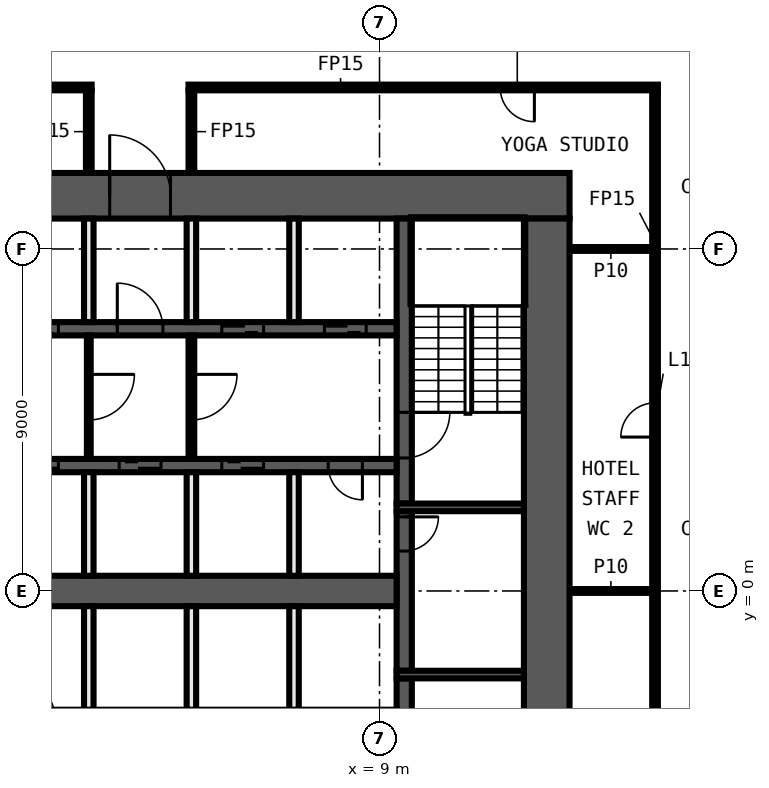
"""IFC4 building model, lengths in metres.
Left out: names, types, materials, properties, quantities, classifications, styles, units other than length and angle.
Written with IfcOpenShell. Run it as: python <this file> out.ifc"""

import sys

from ifc_helpers import new_model, si_unit, direction, frame, frame_2d, origin, place, context, subcontext, project, spatial, rectangle, extrude, element, fill, save


model = new_model("IFC4")
c1 = context("Model", 3, precision=1e-05, world=origin(), true_north=direction((0.0, 1.0)))
c2 = subcontext(c1, "Body", "Model", "MODEL_VIEW")
j1 = project(units=[si_unit("LENGTHUNIT", "METRE"), si_unit("PLANEANGLEUNIT", "RADIAN")], contexts=[c1])
p1 = place(None, origin())
s1 = spatial("IfcSite", under=j1, at=p1, CompositionType="ELEMENT")
p2 = place(p1, origin())
s2 = spatial("IfcBuilding", under=s1, at=p2, CompositionType="ELEMENT")
p3 = place(p2, frame((0.0, 0.0, 69.9)))
s3 = spatial("IfcBuildingStorey", under=s2, at=p3, CompositionType="ELEMENT", Elevation=69.9)
for number, where, z_axis, x_axis in (
    (1, (14.0, 0.0, 0.0), (0.0, 0.0, 1.0), (1.0, 0.0, 0.0)),
    (2, (14.0, 9.0, 0.0), (0.0, 0.0, 1.0), (1.0, 0.0, 0.0)),
):
    element("IfcWall", number, at=place(p3, frame(where, z_axis=z_axis, x_axis=x_axis)), inside=s3, PredefinedType="PARTITIONING", context=c2, shape_type="SweptSolid", body=[
        extrude(rectangle(XDim=2.175, YDim=0.1, at=frame_2d((1.087, 0.0))), origin(), (0.0, 0.0, 1.0), 3.3),
    ])
p4 = place(p3, frame((1.425, 13.25, 0.0), z_axis=(0.0, 0.0, 1.0), x_axis=(-1.0, 0.0, 0.0)))
e3 = element("IfcWall", 3, at=p4, inside=s3, PredefinedType="PARTITIONING", context=c2, shape_type="SweptSolid", body=[
    extrude(rectangle(XDim=17.75, YDim=0.15, at=frame_2d((8.875, 0.0))), origin(), (0.0, 0.0, 1.0), 3.3),
])
p5 = place(p4, frame((5.475, 0.0, 0.0)))
e4 = element("IfcOpeningElement", 4, at=p5, cuts=e3, PredefinedType="OPENING", context=c2, shape_type="SweptSolid", body=[
    extrude(rectangle(XDim=0.9, YDim=2.1, at=frame_2d((0.45, 1.05))), frame((0.0, 0.085, 0.0), z_axis=(0.0, -1.0, 0.0), x_axis=(1.0, 0.0, 0.0)), (0.0, 0.0, 1.0), 0.17),
])
p6 = place(p4, frame((13.6, 0.0, 0.0)))
e5 = element("IfcOpeningElement", 5, at=p6, cuts=e3, PredefinedType="OPENING", context=c2, shape_type="SweptSolid", body=[
    extrude(rectangle(XDim=0.9, YDim=2.1, at=frame_2d((0.45, 1.05))), frame((0.0, 0.085, 0.0), z_axis=(0.0, -1.0, 0.0), x_axis=(1.0, 0.0, 0.0)), (0.0, 0.0, 1.0), 0.17),
])
p7 = place(p3, frame((16.325, 13.25, 0.0), z_axis=(0.0, 0.0, 1.0), x_axis=(-1.0, 0.0, 0.0)))
e6 = element("IfcWall", 6, at=p7, inside=s3, PredefinedType="PARTITIONING", context=c2, shape_type="SweptSolid", body=[
    extrude(rectangle(XDim=12.35, YDim=0.15, at=frame_2d((6.175, 0.0))), origin(), (0.0, 0.0, 1.0), 3.3),
])
p8 = place(p7, frame((3.25, 0.0, 0.0)))
e7 = element("IfcOpeningElement", 7, at=p8, cuts=e6, PredefinedType="OPENING", context=c2, shape_type="SweptSolid", body=[
    extrude(rectangle(XDim=0.9, YDim=2.1, at=frame_2d((0.45, 1.05))), frame((0.0, 0.085, 0.0), z_axis=(0.0, -1.0, 0.0), x_axis=(1.0, 0.0, 0.0)), (0.0, 0.0, 1.0), 0.17),
])
p9 = place(p3, frame((16.25, -13.175, 0.0), z_axis=(0.0, 0.0, 1.0), x_axis=(0.0, 1.0, 0.0)))
e8 = element("IfcWall", 8, at=p9, inside=s3, PredefinedType="PARTITIONING", context=c2, shape_type="SweptSolid", body=[
    extrude(rectangle(XDim=26.35, YDim=0.15, at=frame_2d((13.175, 0.0))), origin(), (0.0, 0.0, 1.0), 3.3),
])
p10 = place(p9, frame((8.225, 0.0, 0.0)))
e9 = element("IfcOpeningElement", 9, at=p10, cuts=e8, PredefinedType="OPENING", context=c2, shape_type="SweptSolid", body=[
    extrude(rectangle(XDim=0.9, YDim=2.1, at=frame_2d((0.45, 1.05))), frame((0.0, 0.085, 0.0), z_axis=(0.0, -1.0, 0.0), x_axis=(1.0, 0.0, 0.0)), (0.0, 0.0, 1.0), 0.17),
])
p11 = place(p9, frame((17.225, 0.0, 0.0)))
e10 = element("IfcOpeningElement", 10, at=p11, cuts=e8, PredefinedType="OPENING", context=c2, shape_type="SweptSolid", body=[
    extrude(rectangle(XDim=0.9, YDim=2.1, at=frame_2d((0.45, 1.05))), frame((0.0, 0.085, 0.0), z_axis=(0.0, -1.0, 0.0), x_axis=(1.0, 0.0, 0.0)), (0.0, 0.0, 1.0), 0.17),
])
for number, where, z_axis, x_axis in (
    (11, (4.05, 11.0, 0.0), (0.0, 0.0, 1.0), (0.0, 1.0, 0.0)),
    (12, (1.35, 11.0, 0.0), (0.0, 0.0, 1.0), (0.0, 1.0, 0.0)),
):
    element("IfcWall", number, at=place(p3, frame(where, z_axis=z_axis, x_axis=x_axis)), inside=s3, PredefinedType="PARTITIONING", context=c2, shape_type="SweptSolid", body=[
        extrude(rectangle(XDim=2.175, YDim=0.15, at=frame_2d((1.087, 0.0))), origin(), (0.0, 0.0, 1.0), 3.3),
    ])
p12 = place(p3, frame((-14.0, 10.4, 0.0), z_axis=(0.0, 0.0, 1.0), x_axis=(1.0, 0.0, 0.0)))
e13 = element("IfcWall", 13, at=p12, inside=s3, PredefinedType="SHEAR", context=c2, shape_type="SweptSolid", body=[
    extrude(rectangle(XDim=28.0, YDim=1.2, at=frame_2d((14.0, 0.0))), origin(), (0.0, 0.0, 1.0), 3.3),
])
p13 = place(p12, frame((15.9, 0.0, 0.0)))
e14 = element("IfcOpeningElement", 14, at=p13, cuts=e13, PredefinedType="OPENING", context=c2, shape_type="SweptSolid", body=[
    extrude(rectangle(XDim=1.6, YDim=2.1, at=frame_2d((0.8, 1.05))), frame((0.0, 0.61, 0.0), z_axis=(0.0, -1.0, 0.0), x_axis=(1.0, 0.0, 0.0)), (0.0, 0.0, 1.0), 1.22),
])
p14 = place(p3, frame((13.4, 9.8, 0.0), z_axis=(0.0, 0.0, 1.0), x_axis=(0.0, -1.0, 0.0)))
e15 = element("IfcWall", 15, at=p14, inside=s3, PredefinedType="SHEAR", context=c2, shape_type="SweptSolid", body=[
    extrude(rectangle(XDim=19.6, YDim=1.2, at=frame_2d((9.8, 0.0))), origin(), (0.0, 0.0, 1.0), 3.3),
])
p15 = place(p3, frame((9.65, -2.3, 0.0), z_axis=(0.0, 0.0, 1.0), x_axis=(0.0, -1.0, 0.0)))
e16 = element("IfcWall", 16, at=p15, inside=s3, PredefinedType="SHEAR", context=c2, shape_type="SweptSolid", body=[
    extrude(rectangle(XDim=7.5, YDim=0.4, at=frame_2d((3.75, 0.0))), origin(), (0.0, 0.0, 1.0), 3.3),
])
p16 = place(p15, frame((1.2, 0.0, 0.0)))
e17 = element("IfcOpeningElement", 17, at=p16, cuts=e16, PredefinedType="OPENING", context=c2, shape_type="SweptSolid", body=[
    extrude(rectangle(XDim=1.2, YDim=2.1, at=frame_2d((0.6, 1.05))), frame((0.0, 0.21, 0.0), z_axis=(0.0, -1.0, 0.0), x_axis=(1.0, 0.0, 0.0)), (0.0, 0.0, 1.0), 0.42),
])
p17 = place(p3, frame((9.65, 2.1, 0.0), z_axis=(0.0, 0.0, 1.0), x_axis=(0.0, -1.0, 0.0)))
e18 = element("IfcWall", 18, at=p17, inside=s3, PredefinedType="SHEAR", context=c2, shape_type="SweptSolid", body=[
    extrude(rectangle(XDim=4.2, YDim=0.4, at=frame_2d((2.1, 0.0))), origin(), (0.0, 0.0, 1.0), 3.3),
])
p18 = place(p17, frame((0.15, 0.0, 0.0)))
e19 = element("IfcOpeningElement", 19, at=p18, cuts=e18, PredefinedType="OPENING", context=c2, shape_type="SweptSolid", body=[
    extrude(rectangle(XDim=0.9, YDim=2.1, at=frame_2d((0.45, 1.05))), frame((0.0, 0.21, 0.0), z_axis=(0.0, -1.0, 0.0), x_axis=(1.0, 0.0, 0.0)), (0.0, 0.0, 1.0), 0.42),
])
p19 = place(p3, frame((9.65, 9.8, 0.0), z_axis=(0.0, 0.0, 1.0), x_axis=(0.0, -1.0, 0.0)))
e20 = element("IfcWall", 20, at=p19, inside=s3, PredefinedType="SHEAR", context=c2, shape_type="SweptSolid", body=[
    extrude(rectangle(XDim=7.5, YDim=0.4, at=frame_2d((3.75, 0.0))), origin(), (0.0, 0.0, 1.0), 3.3),
])
p20 = place(p19, frame((5.1, 0.0, 0.0)))
e21 = element("IfcOpeningElement", 21, at=p20, cuts=e20, PredefinedType="OPENING", context=c2, shape_type="SweptSolid", body=[
    extrude(rectangle(XDim=1.2, YDim=2.1, at=frame_2d((0.6, 1.05))), frame((0.0, 0.21, 0.0), z_axis=(0.0, -1.0, 0.0), x_axis=(1.0, 0.0, 0.0)), (0.0, 0.0, 1.0), 0.42),
])
for number, where, z_axis, x_axis in (
    (22, (9.45, 2.2, 0.0), (0.0, 0.0, 1.0), (1.0, 0.0, 0.0)),
    (23, (9.45, -2.2, 0.0), (0.0, 0.0, 1.0), (1.0, 0.0, 0.0)),
):
    element("IfcWall", number, at=place(p3, frame(where, z_axis=z_axis, x_axis=x_axis)), inside=s3, PredefinedType="SHEAR", context=c2, shape_type="SweptSolid", body=[
        extrude(rectangle(XDim=3.35, YDim=0.2, at=frame_2d((1.675, 0.0))), origin(), (0.0, 0.0, 1.0), 3.3),
    ])
p21 = place(p3, frame((-9.45, 6.9, 0.0), z_axis=(0.0, 0.0, 1.0), x_axis=(1.0, 0.0, 0.0)))
e24 = element("IfcWall", 24, at=p21, inside=s3, PredefinedType="SHEAR", context=c2, shape_type="SweptSolid", body=[
    extrude(rectangle(XDim=18.9, YDim=0.35, at=frame_2d((9.45, 0.0))), origin(), (0.0, 0.0, 1.0), 3.3),
])
p22 = place(p21, frame((0.8, 0.0, 0.0)))
e25 = element("IfcOpeningElement", 25, at=p22, cuts=e24, PredefinedType="OPENING", context=c2, shape_type="SweptSolid", body=[
    extrude(rectangle(XDim=1.1, YDim=2.1, at=frame_2d((0.55, 1.05))), frame((0.0, 0.185, 0.0), z_axis=(0.0, -1.0, 0.0), x_axis=(1.0, 0.0, 0.0)), (0.0, 0.0, 1.0), 0.37),
])
p23 = place(p21, frame((3.5, 0.0, 0.0)))
e26 = element("IfcOpeningElement", 26, at=p23, cuts=e24, PredefinedType="OPENING", context=c2, shape_type="SweptSolid", body=[
    extrude(rectangle(XDim=1.1, YDim=2.1, at=frame_2d((0.55, 1.05))), frame((0.0, 0.185, 0.0), z_axis=(0.0, -1.0, 0.0), x_axis=(1.0, 0.0, 0.0)), (0.0, 0.0, 1.0), 0.37),
])
p24 = place(p21, frame((6.2, 0.0, 0.0)))
e27 = element("IfcOpeningElement", 27, at=p24, cuts=e24, PredefinedType="OPENING", context=c2, shape_type="SweptSolid", body=[
    extrude(rectangle(XDim=1.1, YDim=2.1, at=frame_2d((0.55, 1.05))), frame((0.0, 0.185, 0.0), z_axis=(0.0, -1.0, 0.0), x_axis=(1.0, 0.0, 0.0)), (0.0, 0.0, 1.0), 0.37),
])
p25 = place(p21, frame((8.9, 0.0, 0.0)))
e28 = element("IfcOpeningElement", 28, at=p25, cuts=e24, PredefinedType="OPENING", context=c2, shape_type="SweptSolid", body=[
    extrude(rectangle(XDim=1.1, YDim=2.1, at=frame_2d((0.55, 1.05))), frame((0.0, 0.185, 0.0), z_axis=(0.0, -1.0, 0.0), x_axis=(1.0, 0.0, 0.0)), (0.0, 0.0, 1.0), 0.37),
])
p26 = place(p21, frame((11.55, 0.0, 0.0)))
e29 = element("IfcOpeningElement", 29, at=p26, cuts=e24, PredefinedType="OPENING", context=c2, shape_type="SweptSolid", body=[
    extrude(rectangle(XDim=1.2, YDim=2.1, at=frame_2d((0.6, 1.05))), frame((0.0, 0.185, 0.0), z_axis=(0.0, -1.0, 0.0), x_axis=(1.0, 0.0, 0.0)), (0.0, 0.0, 1.0), 0.37),
])
p27 = place(p21, frame((14.3, 0.0, 0.0)))
e30 = element("IfcOpeningElement", 30, at=p27, cuts=e24, PredefinedType="OPENING", context=c2, shape_type="SweptSolid", body=[
    extrude(rectangle(XDim=1.1, YDim=2.1, at=frame_2d((0.55, 1.05))), frame((0.0, 0.185, 0.0), z_axis=(0.0, -1.0, 0.0), x_axis=(1.0, 0.0, 0.0)), (0.0, 0.0, 1.0), 0.37),
])
p28 = place(p21, frame((17.0, 0.0, 0.0)))
e31 = element("IfcOpeningElement", 31, at=p28, cuts=e24, PredefinedType="OPENING", context=c2, shape_type="SweptSolid", body=[
    extrude(rectangle(XDim=1.1, YDim=2.1, at=frame_2d((0.55, 1.05))), frame((0.0, 0.185, 0.0), z_axis=(0.0, -1.0, 0.0), x_axis=(1.0, 0.0, 0.0)), (0.0, 0.0, 1.0), 0.37),
])
p29 = place(p3, frame((9.45, 3.3, 0.0), z_axis=(0.0, 0.0, 1.0), x_axis=(-1.0, 0.0, 0.0)))
e32 = element("IfcWall", 32, at=p29, inside=s3, PredefinedType="SHEAR", context=c2, shape_type="SweptSolid", body=[
    extrude(rectangle(XDim=18.9, YDim=0.35, at=frame_2d((9.45, 0.0))), origin(), (0.0, 0.0, 1.0), 3.3),
])
p30 = place(p29, frame((17.0, 0.0, 0.0)))
e33 = element("IfcOpeningElement", 33, at=p30, cuts=e32, PredefinedType="OPENING", context=c2, shape_type="SweptSolid", body=[
    extrude(rectangle(XDim=1.1, YDim=2.1, at=frame_2d((0.55, 1.05))), frame((0.0, 0.185, 0.0), z_axis=(0.0, -1.0, 0.0), x_axis=(1.0, 0.0, 0.0)), (0.0, 0.0, 1.0), 0.37),
])
p31 = place(p29, frame((14.3, 0.0, 0.0)))
e34 = element("IfcOpeningElement", 34, at=p31, cuts=e32, PredefinedType="OPENING", context=c2, shape_type="SweptSolid", body=[
    extrude(rectangle(XDim=1.1, YDim=2.1, at=frame_2d((0.55, 1.05))), frame((0.0, 0.185, 0.0), z_axis=(0.0, -1.0, 0.0), x_axis=(1.0, 0.0, 0.0)), (0.0, 0.0, 1.0), 0.37),
])
p32 = place(p29, frame((11.6, 0.0, 0.0)))
e35 = element("IfcOpeningElement", 35, at=p32, cuts=e32, PredefinedType="OPENING", context=c2, shape_type="SweptSolid", body=[
    extrude(rectangle(XDim=1.1, YDim=2.1, at=frame_2d((0.55, 1.05))), frame((0.0, 0.185, 0.0), z_axis=(0.0, -1.0, 0.0), x_axis=(1.0, 0.0, 0.0)), (0.0, 0.0, 1.0), 0.37),
])
p33 = place(p29, frame((8.9, 0.0, 0.0)))
e36 = element("IfcOpeningElement", 36, at=p33, cuts=e32, PredefinedType="OPENING", context=c2, shape_type="SweptSolid", body=[
    extrude(rectangle(XDim=1.1, YDim=2.1, at=frame_2d((0.55, 1.05))), frame((0.0, 0.185, 0.0), z_axis=(0.0, -1.0, 0.0), x_axis=(1.0, 0.0, 0.0)), (0.0, 0.0, 1.0), 0.37),
])
p34 = place(p29, frame((6.2, 0.0, 0.0)))
e37 = element("IfcOpeningElement", 37, at=p34, cuts=e32, PredefinedType="OPENING", context=c2, shape_type="SweptSolid", body=[
    extrude(rectangle(XDim=1.1, YDim=2.1, at=frame_2d((0.55, 1.05))), frame((0.0, 0.185, 0.0), z_axis=(0.0, -1.0, 0.0), x_axis=(1.0, 0.0, 0.0)), (0.0, 0.0, 1.0), 0.37),
])
p35 = place(p29, frame((3.5, 0.0, 0.0)))
e38 = element("IfcOpeningElement", 38, at=p35, cuts=e32, PredefinedType="OPENING", context=c2, shape_type="SweptSolid", body=[
    extrude(rectangle(XDim=1.1, YDim=2.1, at=frame_2d((0.55, 1.05))), frame((0.0, 0.185, 0.0), z_axis=(0.0, -1.0, 0.0), x_axis=(1.0, 0.0, 0.0)), (0.0, 0.0, 1.0), 0.37),
])
p36 = place(p29, frame((0.9, 0.0, 0.0)))
e39 = element("IfcOpeningElement", 39, at=p36, cuts=e32, PredefinedType="OPENING", context=c2, shape_type="SweptSolid", body=[
    extrude(rectangle(XDim=0.9, YDim=2.1, at=frame_2d((0.45, 1.05))), frame((0.0, 0.185, 0.0), z_axis=(0.0, -1.0, 0.0), x_axis=(1.0, 0.0, 0.0)), (0.0, 0.0, 1.0), 0.37),
])
p37 = place(p3, frame((-9.45, 0.0, 0.0), z_axis=(0.0, 0.0, 1.0), x_axis=(1.0, 0.0, 0.0)))
e40 = element("IfcWall", 40, at=p37, inside=s3, PredefinedType="SHEAR", context=c2, shape_type="SweptSolid", body=[
    extrude(rectangle(XDim=18.9, YDim=0.8, at=frame_2d((9.45, 0.0))), origin(), (0.0, 0.0, 1.0), 3.3),
])
for number, where, z_axis, x_axis in (
    (41, (6.75, -3.125, 0.0), (0.0, 0.0, 1.0), (0.0, 1.0, 0.0)),
    (42, (6.75, 0.4, 0.0), (0.0, 0.0, 1.0), (0.0, 1.0, 0.0)),
    (43, (6.75, 7.075, 0.0), (0.0, 0.0, 1.0), (0.0, 1.0, 0.0)),
):
    element("IfcWall", number, at=place(p3, frame(where, z_axis=z_axis, x_axis=x_axis)), inside=s3, PredefinedType="SOLIDWALL", context=c2, shape_type="SweptSolid", body=[
        extrude(rectangle(XDim=2.725, YDim=0.25, at=frame_2d((1.363, 0.0))), origin(), (0.0, 0.0, 1.0), 3.3),
    ])
p38 = place(p3, frame((4.05, 6.725, 0.0), z_axis=(0.0, 0.0, 1.0), x_axis=(0.0, -1.0, 0.0)))
e44 = element("IfcWall", 44, at=p38, inside=s3, PredefinedType="PARTITIONING", context=c2, shape_type="SweptSolid", body=[
    extrude(rectangle(XDim=3.25, YDim=0.15, at=frame_2d((1.625, 0.0))), origin(), (0.0, 0.0, 1.0), 3.3),
])
p39 = place(p38, frame((1.025, 0.0, 0.0)))
e45 = element("IfcOpeningElement", 45, at=p39, cuts=e44, PredefinedType="OPENING", context=c2, shape_type="SweptSolid", body=[
    extrude(rectangle(XDim=1.2, YDim=2.1, at=frame_2d((0.6, 1.05))), frame((0.0, 0.085, 0.0), z_axis=(0.0, -1.0, 0.0), x_axis=(1.0, 0.0, 0.0)), (0.0, 0.0, 1.0), 0.17),
])
for number, where, z_axis, x_axis in (
    (46, (4.05, -3.125, 0.0), (0.0, 0.0, 1.0), (0.0, 1.0, 0.0)),
    (47, (4.05, 0.4, 0.0), (0.0, 0.0, 1.0), (0.0, 1.0, 0.0)),
    (48, (4.05, 7.075, 0.0), (0.0, 0.0, 1.0), (0.0, 1.0, 0.0)),
):
    element("IfcWall", number, at=place(p3, frame(where, z_axis=z_axis, x_axis=x_axis)), inside=s3, PredefinedType="SOLIDWALL", context=c2, shape_type="SweptSolid", body=[
        extrude(rectangle(XDim=2.725, YDim=0.25, at=frame_2d((1.363, 0.0))), origin(), (0.0, 0.0, 1.0), 3.3),
    ])
p40 = place(p3, frame((1.35, 6.725, 0.0), z_axis=(0.0, 0.0, 1.0), x_axis=(0.0, -1.0, 0.0)))
e49 = element("IfcWall", 49, at=p40, inside=s3, PredefinedType="PARTITIONING", context=c2, shape_type="SweptSolid", body=[
    extrude(rectangle(XDim=3.25, YDim=0.1, at=frame_2d((1.625, 0.0))), origin(), (0.0, 0.0, 1.0), 3.3),
])
p41 = place(p40, frame((1.025, 0.0, 0.0)))
e50 = element("IfcOpeningElement", 50, at=p41, cuts=e49, PredefinedType="OPENING", context=c2, shape_type="SweptSolid", body=[
    extrude(rectangle(XDim=1.2, YDim=2.1, at=frame_2d((0.6, 1.05))), frame((0.0, 0.06, 0.0), z_axis=(0.0, -1.0, 0.0), x_axis=(1.0, 0.0, 0.0)), (0.0, 0.0, 1.0), 0.12),
])
for number, where, z_axis, x_axis in (
    (51, (1.35, -3.125, 0.0), (0.0, 0.0, 1.0), (0.0, 1.0, 0.0)),
    (52, (1.35, 0.4, 0.0), (0.0, 0.0, 1.0), (0.0, 1.0, 0.0)),
    (53, (1.35, 7.075, 0.0), (0.0, 0.0, 1.0), (0.0, 1.0, 0.0)),
):
    element("IfcWall", number, at=place(p3, frame(where, z_axis=z_axis, x_axis=x_axis)), inside=s3, PredefinedType="SOLIDWALL", context=c2, shape_type="SweptSolid", body=[
        extrude(rectangle(XDim=2.725, YDim=0.25, at=frame_2d((1.363, 0.0))), origin(), (0.0, 0.0, 1.0), 3.3),
    ])
p42 = place(p11, origin())
e54 = element("IfcDoor", 54, at=p42, inside=s3, OperationType="SINGLE_SWING_RIGHT", PredefinedType="DOOR", context=c2, shape_type="SweptSolid", body=[
    extrude(rectangle(XDim=0.9, YDim=2.1, at=frame_2d((0.45, 1.05))), frame((0.0, 0.025, 0.0), z_axis=(0.0, -1.0, 0.0), x_axis=(1.0, 0.0, 0.0)), (0.0, 0.0, 1.0), 0.05),
])
fill(e10, e54)
p43 = place(p8, origin())
e55 = element("IfcDoor", 55, at=p43, inside=s3, OperationType="SINGLE_SWING_LEFT", PredefinedType="DOOR", context=c2, shape_type="SweptSolid", body=[
    extrude(rectangle(XDim=0.9, YDim=2.1, at=frame_2d((0.45, 1.05))), frame((0.0, 0.025, 0.0), z_axis=(0.0, -1.0, 0.0), x_axis=(1.0, 0.0, 0.0)), (0.0, 0.0, 1.0), 0.05),
])
fill(e7, e55)
p44 = place(p18, origin())
e56 = element("IfcDoor", 56, at=p44, inside=s3, OperationType="SINGLE_SWING_RIGHT", PredefinedType="DOOR", context=c2, shape_type="SweptSolid", body=[
    extrude(rectangle(XDim=0.9, YDim=2.1, at=frame_2d((0.45, 1.05))), frame((0.0, 0.025, 0.0), z_axis=(0.0, -1.0, 0.0), x_axis=(1.0, 0.0, 0.0)), (0.0, 0.0, 1.0), 0.05),
])
fill(e19, e56)
p45 = place(p25, origin())
e57 = element("IfcDoor", 57, at=p45, inside=s3, OperationType="DOUBLE_DOOR_SLIDING", PredefinedType="DOOR", context=c2, shape_type="SweptSolid", body=[
    extrude(rectangle(XDim=1.1, YDim=2.1, at=frame_2d((0.55, 1.05))), frame((0.0, 0.025, 0.0), z_axis=(0.0, -1.0, 0.0), x_axis=(1.0, 0.0, 0.0)), (0.0, 0.0, 1.0), 0.05),
])
fill(e28, e57)
p46 = place(p13, origin())
e58 = element("IfcDoor", 58, at=p46, inside=s3, OperationType="DOUBLE_DOOR_SINGLE_SWING", PredefinedType="DOOR", context=c2, shape_type="SweptSolid", body=[
    extrude(rectangle(XDim=1.6, YDim=2.1, at=frame_2d((0.8, 1.05))), frame((0.0, 0.025, 0.0), z_axis=(0.0, -1.0, 0.0), x_axis=(1.0, 0.0, 0.0)), (0.0, 0.0, 1.0), 0.05),
])
fill(e14, e58)
p47 = place(p26, origin())
e59 = element("IfcDoor", 59, at=p47, inside=s3, OperationType="SINGLE_SWING_LEFT", PredefinedType="DOOR", context=c2, shape_type="SweptSolid", body=[
    extrude(rectangle(XDim=1.2, YDim=2.1, at=frame_2d((0.6, 1.05))), frame((0.0, 0.025, 0.0), z_axis=(0.0, -1.0, 0.0), x_axis=(1.0, 0.0, 0.0)), (0.0, 0.0, 1.0), 0.05),
])
fill(e29, e59)
p48 = place(p27, origin())
e60 = element("IfcDoor", 60, at=p48, inside=s3, OperationType="DOUBLE_DOOR_SLIDING", PredefinedType="DOOR", context=c2, shape_type="SweptSolid", body=[
    extrude(rectangle(XDim=1.1, YDim=2.1, at=frame_2d((0.55, 1.05))), frame((0.0, 0.025, 0.0), z_axis=(0.0, -1.0, 0.0), x_axis=(1.0, 0.0, 0.0)), (0.0, 0.0, 1.0), 0.05),
])
fill(e30, e60)
p49 = place(p28, origin())
e61 = element("IfcDoor", 61, at=p49, inside=s3, OperationType="DOUBLE_DOOR_SLIDING", PredefinedType="DOOR", context=c2, shape_type="SweptSolid", body=[
    extrude(rectangle(XDim=1.1, YDim=2.1, at=frame_2d((0.55, 1.05))), frame((0.0, 0.025, 0.0), z_axis=(0.0, -1.0, 0.0), x_axis=(1.0, 0.0, 0.0)), (0.0, 0.0, 1.0), 0.05),
])
fill(e31, e61)
p50 = place(p33, origin())
e62 = element("IfcDoor", 62, at=p50, inside=s3, OperationType="DOUBLE_DOOR_SLIDING", PredefinedType="DOOR", context=c2, shape_type="SweptSolid", body=[
    extrude(rectangle(XDim=1.1, YDim=2.1, at=frame_2d((0.55, 1.05))), frame((0.0, 0.025, 0.0), z_axis=(0.0, -1.0, 0.0), x_axis=(1.0, 0.0, 0.0)), (0.0, 0.0, 1.0), 0.05),
])
fill(e36, e62)
p51 = place(p34, origin())
e63 = element("IfcDoor", 63, at=p51, inside=s3, OperationType="DOUBLE_DOOR_SLIDING", PredefinedType="DOOR", context=c2, shape_type="SweptSolid", body=[
    extrude(rectangle(XDim=1.1, YDim=2.1, at=frame_2d((0.55, 1.05))), frame((0.0, 0.025, 0.0), z_axis=(0.0, -1.0, 0.0), x_axis=(1.0, 0.0, 0.0)), (0.0, 0.0, 1.0), 0.05),
])
fill(e37, e63)
p52 = place(p35, origin())
e64 = element("IfcDoor", 64, at=p52, inside=s3, OperationType="DOUBLE_DOOR_SLIDING", PredefinedType="DOOR", context=c2, shape_type="SweptSolid", body=[
    extrude(rectangle(XDim=1.1, YDim=2.1, at=frame_2d((0.55, 1.05))), frame((0.0, 0.025, 0.0), z_axis=(0.0, -1.0, 0.0), x_axis=(1.0, 0.0, 0.0)), (0.0, 0.0, 1.0), 0.05),
])
fill(e38, e64)
p53 = place(p36, origin())
e65 = element("IfcDoor", 65, at=p53, inside=s3, OperationType="SINGLE_SWING_LEFT", PredefinedType="DOOR", context=c2, shape_type="SweptSolid", body=[
    extrude(rectangle(XDim=0.9, YDim=2.1, at=frame_2d((0.45, 1.05))), frame((0.0, 0.025, 0.0), z_axis=(0.0, -1.0, 0.0), x_axis=(1.0, 0.0, 0.0)), (0.0, 0.0, 1.0), 0.05),
])
fill(e39, e65)
p54 = place(p20, origin())
e66 = element("IfcDoor", 66, at=p54, inside=s3, OperationType="SINGLE_SWING_LEFT", PredefinedType="DOOR", context=c2, shape_type="SweptSolid", body=[
    extrude(rectangle(XDim=1.2, YDim=2.1, at=frame_2d((0.6, 1.05))), frame((0.0, 0.025, 0.0), z_axis=(0.0, -1.0, 0.0), x_axis=(1.0, 0.0, 0.0)), (0.0, 0.0, 1.0), 0.05),
])
fill(e21, e66)
p55 = place(p41, origin())
e67 = element("IfcDoor", 67, at=p55, inside=s3, OperationType="SINGLE_SWING_LEFT", PredefinedType="DOOR", context=c2, shape_type="SweptSolid", body=[
    extrude(rectangle(XDim=1.2, YDim=2.1, at=frame_2d((0.6, 1.05))), frame((0.0, 0.025, 0.0), z_axis=(0.0, -1.0, 0.0), x_axis=(1.0, 0.0, 0.0)), (0.0, 0.0, 1.0), 0.05),
])
fill(e50, e67)
p56 = place(p39, origin())
e68 = element("IfcDoor", 68, at=p56, inside=s3, OperationType="SINGLE_SWING_RIGHT", PredefinedType="DOOR", context=c2, shape_type="SweptSolid", body=[
    extrude(rectangle(XDim=1.2, YDim=2.1, at=frame_2d((0.6, 1.05))), frame((0.0, 0.025, 0.0), z_axis=(0.0, -1.0, 0.0), x_axis=(1.0, 0.0, 0.0)), (0.0, 0.0, 1.0), 0.05),
])
fill(e45, e68)
save(model, sys.argv[1])
